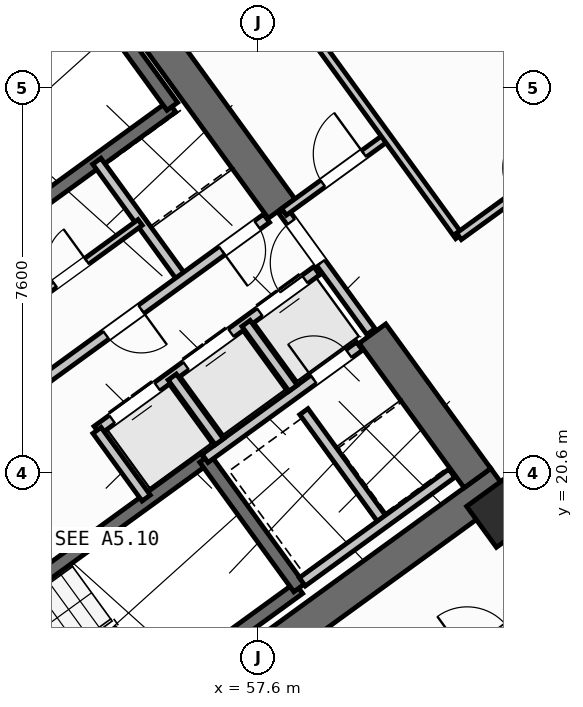
"""IFC4 building model, lengths in metres.
Left out: names, types, materials, properties, quantities, classifications, styles, units other than length and angle.
Written with IfcOpenShell. Run it as: python <this file> out.ifc"""

import sys

from ifc_helpers import new_model, si_unit, direction, frame, frame_2d, origin, origin_2d, place, context, subcontext, project, spatial, rectangle, hollow_rectangle, extrude, source, transform, mapped, element, fill, save


model = new_model("IFC4")
c1 = context("Model", 3, precision=1e-05, world=origin(), true_north=direction((0.0, 1.0)))
c2 = subcontext(c1, "Body", "Model", "MODEL_VIEW")
j1 = project(units=[si_unit("LENGTHUNIT", "METRE"), si_unit("PLANEANGLEUNIT", "RADIAN")], contexts=[c1])
p1 = place(None, origin())
s1 = spatial("IfcSite", under=j1, at=p1, CompositionType="ELEMENT")
p2 = place(p1, origin())
s2 = spatial("IfcBuilding", under=s1, at=p2, CompositionType="ELEMENT")
p3 = place(p2, frame((0.0, 0.0, 60.0)))
s3 = spatial("IfcBuildingStorey", under=s2, at=p3, CompositionType="ELEMENT", Elevation=60.0)
p4 = place(p3, frame((52.318, 13.11, 0.0), z_axis=(0.0, 0.0, 1.0), x_axis=(0.809019445368, 0.587781878776, 0.0)))
e1 = element("IfcWall", 1, at=p4, inside=s3, PredefinedType="SHEAR", context=c2, shape_type="SweptSolid", body=[
    extrude(rectangle(XDim=12.44, YDim=0.65, at=frame_2d((6.22, 0.0))), origin(), (0.0, 0.0, 1.0), 3.35),
])
p5 = place(p3, frame((44.325, 24.113, 0.0), z_axis=(0.0, 0.0, 1.0), x_axis=(0.809012664862, 0.58779121131, 0.0)))
e2 = element("IfcWall", 2, at=p5, inside=s3, PredefinedType="SHEAR", context=c2, shape_type="SweptSolid", body=[
    extrude(rectangle(XDim=12.44, YDim=0.65, at=frame_2d((6.22, 0.0))), origin(), (0.0, 0.0, 1.0), 3.35),
])
p6 = place(p3, frame((61.929, 20.494, 0.0), z_axis=(0.0, 0.0, 1.0), x_axis=(-0.58782982593, 0.808984607855, 0.0)))
e3 = element("IfcWall", 3, at=p6, inside=s3, PredefinedType="SHEAR", context=c2, shape_type="SweptSolid", body=[
    extrude(rectangle(XDim=3.525, YDim=0.65, at=frame_2d((1.762, 0.0))), origin(), (0.0, 0.0, 1.0), 3.35),
])
p7 = place(p3, frame((58.064, 25.813, 0.0), z_axis=(0.0, 0.0, 1.0), x_axis=(-0.58777996584, 0.809020835181, 0.0)))
e4 = element("IfcWall", 4, at=p7, inside=s3, PredefinedType="SHEAR", context=c2, shape_type="SweptSolid", body=[
    extrude(rectangle(XDim=6.375, YDim=0.65, at=frame_2d((3.188, 0.0))), origin(), (0.0, 0.0, 1.0), 3.35),
])
m1 = source(origin(), c2, "Body", "SweptSolid", [
    extrude(hollow_rectangle(XDim=1.0, YDim=1.0, WallThickness=0.04, at=origin_2d()), origin(), (0.0, 0.0, 1.0), 3.6),
])
for number, where, z_axis, x_axis in (
    (5, (62.414, 19.827, 0.0), (0.0, 0.0, 1.0), (0.809, 0.588, 0.0)),
    (6, (62.977, 29.259, 0.0), (0.0, 0.0, 1.0), (0.809, 0.588, 0.0)),
):
    element("IfcColumn", number, at=place(p3, frame(where, z_axis=z_axis, x_axis=x_axis)), inside=s3, PredefinedType="COLUMN", context=c2, shape_type="MappedRepresentation", body=[
        mapped(m1, transform((0.0, 0.0, 0.0), scale=1.0)),
    ])
p8 = place(p3, frame((43.938, 25.192, 0.0), z_axis=(0.0, 0.0, 1.0), x_axis=(0.809016324578, 0.587786174187, 0.0)))
e7 = element("IfcWall", 7, at=p8, inside=s3, PredefinedType="STANDARD", context=c2, shape_type="SweptSolid", body=[
    extrude(rectangle(XDim=17.587, YDim=0.32, at=frame_2d((8.794, 0.0))), origin(), (0.0, 0.0, 1.0), 3.35),
])
p9 = place(p8, frame((14.914, 0.0, 0.0)))
e8 = element("IfcOpeningElement", 8, at=p9, cuts=e7, PredefinedType="OPENING", context=c2, shape_type="SweptSolid", body=[
    extrude(rectangle(XDim=1.05, YDim=2.15, at=frame_2d((0.525, 1.075))), frame((0.0, 0.17, 0.0), z_axis=(0.0, -1.0, 0.0), x_axis=(1.0, 0.0, 0.0)), (0.0, 0.0, 1.0), 0.34),
])
p10 = place(p8, frame((2.169, 0.0, 0.8)))
e9 = element("IfcOpeningElement", 9, at=p10, cuts=e7, PredefinedType="OPENING", context=c2, shape_type="SweptSolid", body=[
    extrude(rectangle(XDim=2.1, YDim=1.55, at=frame_2d((1.05, 0.775))), frame((0.0, 0.17, 0.0), z_axis=(0.0, -1.0, 0.0), x_axis=(1.0, 0.0, 0.0)), (0.0, 0.0, 1.0), 0.34),
])
p11 = place(p8, frame((7.319, 0.0, 0.8)))
e10 = element("IfcOpeningElement", 10, at=p11, cuts=e7, PredefinedType="OPENING", context=c2, shape_type="SweptSolid", body=[
    extrude(rectangle(XDim=2.1, YDim=1.55, at=frame_2d((1.05, 0.775))), frame((0.0, 0.17, 0.0), z_axis=(0.0, -1.0, 0.0), x_axis=(1.0, 0.0, 0.0)), (0.0, 0.0, 1.0), 0.34),
])
p12 = place(p3, frame((58.455, 35.484, 0.0), z_axis=(0.0, 0.0, 1.0), x_axis=(0.587783625747, -0.809018176127, 0.0)))
e11 = element("IfcWall", 11, at=p12, inside=s3, PredefinedType="STANDARD", context=c2, shape_type="SweptSolid", body=[
    extrude(rectangle(XDim=21.587, YDim=0.32, at=frame_2d((10.794, 0.0))), origin(), (0.0, 0.0, 1.0), 2.725),
])
p13 = place(p12, frame((1.54, 0.0, 0.85)))
e12 = element("IfcOpeningElement", 12, at=p13, cuts=e11, PredefinedType="OPENING", context=c2, shape_type="SweptSolid", body=[
    extrude(rectangle(XDim=1.5, YDim=1.5, at=frame_2d((0.75, 0.75))), frame((0.0, 0.17, 0.0), z_axis=(0.0, -1.0, 0.0), x_axis=(1.0, 0.0, 0.0)), (0.0, 0.0, 1.0), 0.34),
])
p14 = place(p12, frame((4.695, 0.0, 0.85)))
e13 = element("IfcOpeningElement", 13, at=p14, cuts=e11, PredefinedType="OPENING", context=c2, shape_type="SweptSolid", body=[
    extrude(rectangle(XDim=1.8, YDim=1.5, at=frame_2d((0.9, 0.75))), frame((0.0, 0.17, 0.0), z_axis=(0.0, -1.0, 0.0), x_axis=(1.0, 0.0, 0.0)), (0.0, 0.0, 1.0), 0.34),
])
p15 = place(p12, frame((13.009, 0.0, 1.0)))
e14 = element("IfcOpeningElement", 14, at=p15, cuts=e11, PredefinedType="OPENING", context=c2, shape_type="SweptSolid", body=[
    extrude(rectangle(XDim=0.9, YDim=1.25, at=frame_2d((0.45, 0.625))), frame((0.0, 0.17, 0.0), z_axis=(0.0, -1.0, 0.0), x_axis=(1.0, 0.0, 0.0)), (0.0, 0.0, 1.0), 0.34),
])
p16 = place(p12, frame((16.092, 0.0, 0.95)))
e15 = element("IfcOpeningElement", 15, at=p16, cuts=e11, PredefinedType="OPENING", context=c2, shape_type="SweptSolid", body=[
    extrude(rectangle(XDim=1.2, YDim=1.4, at=frame_2d((0.6, 0.7))), frame((0.0, 0.17, 0.0), z_axis=(0.0, -1.0, 0.0), x_axis=(1.0, 0.0, 0.0)), (0.0, 0.0, 1.0), 0.34),
])
p17 = place(p12, frame((19.085, 0.0, 1.0)))
e16 = element("IfcOpeningElement", 16, at=p17, cuts=e11, PredefinedType="OPENING", context=c2, shape_type="SweptSolid", body=[
    extrude(rectangle(XDim=0.9, YDim=1.25, at=frame_2d((0.45, 0.625))), frame((0.0, 0.17, 0.0), z_axis=(0.0, -1.0, 0.0), x_axis=(1.0, 0.0, 0.0)), (0.0, 0.0, 1.0), 0.34),
])
p18 = place(p3, frame((71.098, 17.731, 0.0), z_axis=(0.0, 0.0, 1.0), x_axis=(-0.809021120468, -0.587779573171, 0.0)))
e17 = element("IfcWall", 17, at=p18, inside=s3, PredefinedType="STANDARD", context=c2, shape_type="SweptSolid", body=[
    extrude(rectangle(XDim=17.588, YDim=0.32, at=frame_2d((8.794, 0.0))), origin(), (0.0, 0.0, 1.0), 3.35),
])
p19 = place(p18, frame((1.624, 0.0, 0.0)))
e18 = element("IfcOpeningElement", 18, at=p19, cuts=e17, PredefinedType="OPENING", context=c2, shape_type="SweptSolid", body=[
    extrude(rectangle(XDim=1.05, YDim=2.15, at=frame_2d((0.525, 1.075))), frame((0.0, 0.17, 0.0), z_axis=(0.0, -1.0, 0.0), x_axis=(1.0, 0.0, 0.0)), (0.0, 0.0, 1.0), 0.34),
])
p20 = place(p18, frame((4.104, 0.0, 1.0)))
e19 = element("IfcOpeningElement", 19, at=p20, cuts=e17, PredefinedType="OPENING", context=c2, shape_type="SweptSolid", body=[
    extrude(rectangle(XDim=0.9, YDim=1.25, at=frame_2d((0.45, 0.625))), frame((0.0, 0.17, 0.0), z_axis=(0.0, -1.0, 0.0), x_axis=(1.0, 0.0, 0.0)), (0.0, 0.0, 1.0), 0.34),
])
p21 = place(p18, frame((7.879, 0.0, 0.85)))
e20 = element("IfcOpeningElement", 20, at=p21, cuts=e17, PredefinedType="OPENING", context=c2, shape_type="SweptSolid", body=[
    extrude(rectangle(XDim=1.8, YDim=1.5, at=frame_2d((0.9, 0.75))), frame((0.0, 0.17, 0.0), z_axis=(0.0, -1.0, 0.0), x_axis=(1.0, 0.0, 0.0)), (0.0, 0.0, 1.0), 0.34),
])
p22 = place(p18, frame((13.529, 0.0, 0.85)))
e21 = element("IfcOpeningElement", 21, at=p22, cuts=e17, PredefinedType="OPENING", context=c2, shape_type="SweptSolid", body=[
    extrude(rectangle(XDim=1.5, YDim=1.5, at=frame_2d((0.75, 0.75))), frame((0.0, 0.17, 0.0), z_axis=(0.0, -1.0, 0.0), x_axis=(1.0, 0.0, 0.0)), (0.0, 0.0, 1.0), 0.34),
])
p23 = place(p3, frame((48.006, 25.996, 0.0), z_axis=(0.0, 0.0, 1.0), x_axis=(0.80901903764, 0.587782439969, 0.0)))
e22 = element("IfcWall", 22, at=p23, inside=s3, PredefinedType="SHEAR", context=c2, shape_type="SweptSolid", body=[
    extrude(rectangle(XDim=7.46, YDim=0.26, at=frame_2d((3.73, 0.0))), origin(), (0.0, 0.0, 1.0), 3.35),
])
p24 = place(p3, frame((49.863, 23.44, 0.0), z_axis=(0.0, 0.0, 1.0), x_axis=(0.809003474932, 0.587803859759, 0.0)))
e23 = element("IfcWall", 23, at=p24, inside=s3, PredefinedType="SHEAR", context=c2, shape_type="SweptSolid", body=[
    extrude(rectangle(XDim=7.46, YDim=0.26, at=frame_2d((3.73, 0.0))), origin(), (0.0, 0.0, 1.0), 3.35),
])
p25 = place(p24, frame((0.36, 0.0, 0.0)))
e24 = element("IfcOpeningElement", 24, at=p25, cuts=e23, PredefinedType="OPENING", context=c2, shape_type="SweptSolid", body=[
    extrude(rectangle(XDim=0.86, YDim=2.05, at=frame_2d((0.43, 1.025))), frame((0.0, 0.14, 0.0), z_axis=(0.0, -1.0, 0.0), x_axis=(1.0, 0.0, 0.0)), (0.0, 0.0, 1.0), 0.28),
])
p26 = place(p3, frame((55.906, 27.831, 0.0), z_axis=(0.0, 0.0, 1.0), x_axis=(-0.587804123638, 0.809003283204, 0.0)))
e25 = element("IfcWall", 25, at=p26, inside=s3, PredefinedType="SHEAR", context=c2, shape_type="SweptSolid", body=[
    extrude(rectangle(XDim=3.16, YDim=0.26, at=frame_2d((1.58, 0.0))), origin(), (0.0, 0.0, 1.0), 3.35),
])
p27 = place(p3, frame((52.472, 14.013, 0.0), z_axis=(0.0, 0.0, 1.0), x_axis=(0.809028366311, 0.587769599847, 0.0)))
e26 = element("IfcWall", 26, at=p27, inside=s3, PredefinedType="SHEAR", context=c2, shape_type="SweptSolid", body=[
    extrude(rectangle(XDim=7.33, YDim=0.26, at=frame_2d((3.665, 0.0))), origin(), (0.0, 0.0, 1.0), 3.35),
])
p28 = place(p3, frame((50.615, 16.57, 0.0), z_axis=(0.0, 0.0, 1.0), x_axis=(0.809028366311, 0.587769599847, 0.0)))
e27 = element("IfcWall", 27, at=p28, inside=s3, PredefinedType="SHEAR", context=c2, shape_type="SweptSolid", body=[
    extrude(rectangle(XDim=7.33, YDim=0.26, at=frame_2d((3.665, 0.0))), origin(), (0.0, 0.0, 1.0), 3.35),
])
p29 = place(p28, frame((0.22, 0.0, 0.0)))
e28 = element("IfcOpeningElement", 28, at=p29, cuts=e27, PredefinedType="OPENING", context=c2, shape_type="SweptSolid", body=[
    extrude(rectangle(XDim=1.1, YDim=2.1, at=frame_2d((0.55, 1.05))), frame((0.0, 0.14, 0.0), z_axis=(0.0, -1.0, 0.0), x_axis=(1.0, 0.0, 0.0)), (0.0, 0.0, 1.0), 0.28),
])
p30 = place(p3, frame((58.41, 18.327, 0.0), z_axis=(0.0, 0.0, 1.0), x_axis=(-0.58776738483, 0.809029975545, 0.0)))
e29 = element("IfcWall", 29, at=p30, inside=s3, PredefinedType="SHEAR", context=c2, shape_type="SweptSolid", body=[
    extrude(rectangle(XDim=3.16, YDim=0.26, at=frame_2d((1.58, 0.0))), origin(), (0.0, 0.0, 1.0), 3.35),
])
p31 = place(p3, frame((56.553, 20.884, 0.0), z_axis=(0.0, 0.0, 1.0), x_axis=(0.809035789462, 0.587759382205, 0.0)))
e30 = element("IfcWall", 30, at=p31, inside=s3, PredefinedType="STANDARD", context=c2, shape_type="SweptSolid", body=[
    extrude(rectangle(XDim=3.768, YDim=0.2, at=frame_2d((1.884, 0.0))), origin(), (0.0, 0.0, 1.0), 3.34),
])
p32 = place(p31, frame((2.65, 0.0, 0.0)))
e31 = element("IfcOpeningElement", 31, at=p32, cuts=e30, PredefinedType="OPENING", context=c2, shape_type="SweptSolid", body=[
    extrude(rectangle(XDim=0.86, YDim=2.05, at=frame_2d((0.43, 1.025))), frame((0.0, 0.11, 0.0), z_axis=(0.0, -1.0, 0.0), x_axis=(1.0, 0.0, 0.0)), (0.0, 0.0, 1.0), 0.22),
])
p33 = place(p3, frame((54.421, 21.436, 0.0), z_axis=(0.0, 0.0, 1.0), x_axis=(0.809013710463, 0.587789772183, 0.0)))
e32 = element("IfcWall", 32, at=p33, inside=s3, PredefinedType="STANDARD", context=c2, shape_type="SweptSolid", body=[
    extrude(rectangle(XDim=5.36, YDim=0.2, at=frame_2d((2.68, 0.0))), origin(), (0.0, 0.0, 1.0), 3.34),
])
p34 = place(p33, frame((0.37, 0.0, 0.0)))
e33 = element("IfcOpeningElement", 33, at=p34, cuts=e32, PredefinedType="OPENING", context=c2, shape_type="SweptSolid", body=[
    extrude(rectangle(XDim=1.1, YDim=2.15, at=frame_2d((0.55, 1.075))), frame((0.0, 0.11, 0.0), z_axis=(0.0, -1.0, 0.0), x_axis=(1.0, 0.0, 0.0)), (0.0, 0.0, 1.0), 0.22),
])
p35 = place(p33, frame((2.17, 0.0, 0.0)))
e34 = element("IfcOpeningElement", 34, at=p35, cuts=e32, PredefinedType="OPENING", context=c2, shape_type="SweptSolid", body=[
    extrude(rectangle(XDim=1.1, YDim=2.15, at=frame_2d((0.55, 1.075))), frame((0.0, 0.11, 0.0), z_axis=(0.0, -1.0, 0.0), x_axis=(1.0, 0.0, 0.0)), (0.0, 0.0, 1.0), 0.22),
])
p36 = place(p33, frame((3.97, 0.0, 0.0)))
e35 = element("IfcOpeningElement", 35, at=p36, cuts=e32, PredefinedType="OPENING", context=c2, shape_type="SweptSolid", body=[
    extrude(rectangle(XDim=1.1, YDim=2.15, at=frame_2d((0.55, 1.075))), frame((0.0, 0.11, 0.0), z_axis=(0.0, -1.0, 0.0), x_axis=(1.0, 0.0, 0.0)), (0.0, 0.0, 1.0), 0.22),
])
p37 = place(p3, frame((55.391, 20.102, 0.0), z_axis=(0.0, 0.0, 1.0), x_axis=(-0.58778447739, 0.809017557374, 0.0)))
e36 = element("IfcWall", 36, at=p37, inside=s3, PredefinedType="STANDARD", context=c2, shape_type="SweptSolid", body=[
    extrude(rectangle(XDim=1.65, YDim=0.2, at=frame_2d((0.825, 0.0))), origin(), (0.0, 0.0, 1.0), 3.34),
])
p38 = place(p3, frame((56.834, 21.212, 0.0), z_axis=(0.0, 0.0, 1.0), x_axis=(-0.58776738483, 0.809029975545, 0.0)))
e37 = element("IfcWall", 37, at=p38, inside=s3, PredefinedType="STANDARD", context=c2, shape_type="SweptSolid", body=[
    extrude(rectangle(XDim=1.58, YDim=0.2, at=frame_2d((0.79, 0.0))), origin(), (0.0, 0.0, 1.0), 3.34),
])
p39 = place(p3, frame((58.29, 22.27, 0.0), z_axis=(0.0, 0.0, 1.0), x_axis=(-0.587840865826, 0.808976585857, 0.0)))
e38 = element("IfcWall", 38, at=p39, inside=s3, PredefinedType="STANDARD", context=c2, shape_type="SweptSolid", body=[
    extrude(rectangle(XDim=1.58, YDim=0.2, at=frame_2d((0.79, 0.0))), origin(), (0.0, 0.0, 1.0), 3.34),
])
p40 = place(p3, frame((60.067, 19.655, 0.0), z_axis=(0.0, 0.0, 1.0), x_axis=(-0.587800520745, 0.809005900975, 0.0)))
e39 = element("IfcWall", 39, at=p40, inside=s3, PredefinedType="STANDARD", context=c2, shape_type="SweptSolid", body=[
    extrude(rectangle(XDim=2.66, YDim=0.2, at=frame_2d((1.33, 0.0))), origin(), (0.0, 0.0, 1.0), 3.34),
])
p41 = place(p3, frame((58.472, 18.447, 0.0), z_axis=(0.0, 0.0, 1.0), x_axis=(0.809022487728, 0.587777691266, 0.0)))
e40 = element("IfcWall", 40, at=p41, inside=s3, PredefinedType="STANDARD", context=c2, shape_type="SweptSolid", body=[
    extrude(rectangle(XDim=3.648, YDim=0.2, at=frame_2d((1.824, 0.0))), origin(), (0.0, 0.0, 1.0), 3.34),
])
p42 = place(p3, frame((56.111, 24.419, 0.0), z_axis=(0.0, 0.0, 1.0), x_axis=(-0.58777848983, 0.809021907548, 0.0)))
e41 = element("IfcWall", 41, at=p42, inside=s3, PredefinedType="STANDARD", context=c2, shape_type="SweptSolid", body=[
    extrude(rectangle(XDim=2.88, YDim=0.2, at=frame_2d((1.44, 0.0))), origin(), (0.0, 0.0, 1.0), 3.34),
])
p43 = place(p3, frame((53.425, 22.468, 0.0), z_axis=(0.0, 0.0, 1.0), x_axis=(0.80902705128, 0.587771409902, 0.0)))
e42 = element("IfcWall", 42, at=p43, inside=s3, PredefinedType="STANDARD", context=c2, shape_type="SweptSolid", body=[
    extrude(rectangle(XDim=5.368, YDim=0.2, at=frame_2d((2.684, 0.0))), origin(), (0.0, 0.0, 1.0), 3.34),
])
p44 = place(p43, frame((4.28, 0.0, 0.0)))
e43 = element("IfcOpeningElement", 43, at=p44, cuts=e42, PredefinedType="OPENING", context=c2, shape_type="SweptSolid", body=[
    extrude(rectangle(XDim=0.86, YDim=2.05, at=frame_2d((0.43, 1.025))), frame((0.0, 0.11, 0.0), z_axis=(0.0, -1.0, 0.0), x_axis=(1.0, 0.0, 0.0)), (0.0, 0.0, 1.0), 0.22),
])
p45 = place(p43, frame((1.45, 0.0, 0.0)))
e44 = element("IfcOpeningElement", 44, at=p45, cuts=e42, PredefinedType="OPENING", context=c2, shape_type="SweptSolid", body=[
    extrude(rectangle(XDim=0.86, YDim=2.05, at=frame_2d((0.43, 1.025))), frame((0.0, 0.11, 0.0), z_axis=(0.0, -1.0, 0.0), x_axis=(1.0, 0.0, 0.0)), (0.0, 0.0, 1.0), 0.22),
])
p46 = place(p3, frame((52.618, 23.612, 0.0), z_axis=(0.0, 0.0, 1.0), x_axis=(0.809009587469, 0.587795446889, 0.0)))
e45 = element("IfcWall", 45, at=p46, inside=s3, PredefinedType="PLUMBINGWALL", context=c2, shape_type="SweptSolid", body=[
    extrude(rectangle(XDim=3.28, YDim=0.14, at=frame_2d((1.64, 0.0))), origin(), (0.0, 0.0, 1.0), 3.34),
])
p47 = place(p46, frame((1.2, 0.0, 0.0)))
e46 = element("IfcOpeningElement", 46, at=p47, cuts=e45, PredefinedType="OPENING", context=c2, shape_type="SweptSolid", body=[
    extrude(rectangle(XDim=0.78, YDim=2.05, at=frame_2d((0.39, 1.025))), frame((0.0, 0.08, 0.0), z_axis=(0.0, -1.0, 0.0), x_axis=(1.0, 0.0, 0.0)), (0.0, 0.0, 1.0), 0.16),
])
p48 = place(p3, frame((59.827, 23.386, 0.0), z_axis=(0.0, 0.0, 1.0), x_axis=(-0.587803840107, 0.809003489211, 0.0)))
e47 = element("IfcWall", 47, at=p48, inside=s3, PredefinedType="STANDARD", context=c2, shape_type="SweptSolid", body=[
    extrude(rectangle(XDim=2.96, YDim=0.2, at=frame_2d((1.48, 0.0))), origin(), (0.0, 0.0, 1.0), 3.34),
])
p49 = place(p48, frame((1.68, 0.0, 0.0)))
e48 = element("IfcOpeningElement", 48, at=p49, cuts=e47, PredefinedType="OPENING", context=c2, shape_type="SweptSolid", body=[
    extrude(rectangle(XDim=1.0, YDim=2.1, at=frame_2d((0.5, 1.05))), frame((0.0, 0.11, 0.0), z_axis=(0.0, -1.0, 0.0), x_axis=(1.0, 0.0, 0.0)), (0.0, 0.0, 1.0), 0.22),
])
p50 = place(p3, frame((58.111, 25.749, 0.0), z_axis=(0.0, 0.0, 1.0), x_axis=(0.809000999347, 0.58780726693, 0.0)))
e49 = element("IfcWall", 49, at=p50, inside=s3, PredefinedType="PARTITIONING", context=c2, shape_type="SweptSolid", body=[
    extrude(rectangle(XDim=2.51, YDim=0.16, at=frame_2d((1.255, 0.0))), origin(), (0.0, 0.0, 1.0), 2.725),
])
p51 = place(p50, frame((0.95, 0.0, 0.0)))
e50 = element("IfcOpeningElement", 50, at=p51, cuts=e49, PredefinedType="OPENING", context=c2, shape_type="SweptSolid", body=[
    extrude(rectangle(XDim=1.0, YDim=2.1, at=frame_2d((0.5, 1.05))), frame((0.0, 0.09, 0.0), z_axis=(0.0, -1.0, 0.0), x_axis=(1.0, 0.0, 0.0)), (0.0, 0.0, 1.0), 0.18),
])
p52 = place(p3, frame((61.564, 25.266, 0.0), z_axis=(0.0, 0.0, 1.0), x_axis=(-0.587792629712, 0.809011634314, 0.0)))
e51 = element("IfcWall", 51, at=p52, inside=s3, PredefinedType="PARTITIONING", context=c2, shape_type="SweptSolid", body=[
    extrude(rectangle(XDim=10.15, YDim=0.16, at=frame_2d((5.075, 0.0))), origin(), (0.0, 0.0, 1.0), 3.34),
])
p53 = place(p3, frame((61.564, 25.266, 0.0), z_axis=(0.0, 0.0, 1.0), x_axis=(0.809012309495, 0.587791700422, 0.0)))
e52 = element("IfcWall", 52, at=p53, inside=s3, PredefinedType="PARTITIONING", context=c2, shape_type="SweptSolid", body=[
    extrude(rectangle(XDim=3.63, YDim=0.16, at=frame_2d((1.815, 0.0))), origin(), (0.0, 0.0, 1.0), 3.34),
])
p54 = place(p53, frame((1.305, 0.0, 0.0)))
e53 = element("IfcOpeningElement", 53, at=p54, cuts=e52, PredefinedType="OPENING", context=c2, shape_type="SweptSolid", body=[
    extrude(rectangle(XDim=1.0, YDim=2.1, at=frame_2d((0.5, 1.05))), frame((0.0, 0.09, 0.0), z_axis=(0.0, -1.0, 0.0), x_axis=(1.0, 0.0, 0.0)), (0.0, 0.0, 1.0), 0.18),
])
p55 = place(p3, frame((53.705, 11.126, 0.0), z_axis=(0.0, 0.0, 1.0), x_axis=(0.809014504436, 0.587788679384, 0.0)))
e54 = element("IfcWall", 54, at=p55, inside=s3, PredefinedType="PARTITIONING", context=c2, shape_type="SweptSolid", body=[
    extrude(rectangle(XDim=14.67, YDim=0.16, at=frame_2d((7.335, 0.0))), origin(), (0.0, 0.0, 1.0), 3.34),
])
p56 = place(p55, frame((3.215, 0.0, 0.0)))
e55 = element("IfcOpeningElement", 55, at=p56, cuts=e54, PredefinedType="OPENING", context=c2, shape_type="SweptSolid", body=[
    extrude(rectangle(XDim=1.0, YDim=2.1, at=frame_2d((0.5, 1.05))), frame((0.0, 0.09, 0.0), z_axis=(0.0, -1.0, 0.0), x_axis=(1.0, 0.0, 0.0)), (0.0, 0.0, 1.0), 0.18),
])
p57 = place(p55, frame((9.915, 0.0, 0.0)))
e56 = element("IfcOpeningElement", 56, at=p57, cuts=e54, PredefinedType="OPENING", context=c2, shape_type="SweptSolid", body=[
    extrude(rectangle(XDim=1.0, YDim=2.1, at=frame_2d((0.5, 1.05))), frame((0.0, 0.09, 0.0), z_axis=(0.0, -1.0, 0.0), x_axis=(1.0, 0.0, 0.0)), (0.0, 0.0, 1.0), 0.18),
])
m2 = source(origin(), c2, "Body", "SweptSolid", [
    extrude(rectangle(XDim=1.1, YDim=2.15, at=frame_2d((0.55, 1.075))), frame((0.0, 0.025, 0.0), z_axis=(0.0, -1.0, 0.0), x_axis=(1.0, 0.0, 0.0)), (0.0, 0.0, 1.0), 0.05),
])
p58 = place(p34, origin())
e57 = element("IfcDoor", 57, at=p58, inside=s3, OperationType="DOUBLE_DOOR_SLIDING", PredefinedType="DOOR", context=c2, shape_type="MappedRepresentation", body=[
    mapped(m2, transform((0.0, 0.0, 0.0), scale=1.0)),
])
fill(e33, e57)
p59 = place(p35, origin())
e58 = element("IfcDoor", 58, at=p59, inside=s3, OperationType="DOUBLE_DOOR_SLIDING", PredefinedType="DOOR", context=c2, shape_type="MappedRepresentation", body=[
    mapped(m2, transform((0.0, 0.0, 0.0), scale=1.0)),
])
fill(e34, e58)
p60 = place(p36, origin())
e59 = element("IfcDoor", 59, at=p60, inside=s3, OperationType="DOUBLE_DOOR_SLIDING", PredefinedType="DOOR", context=c2, shape_type="MappedRepresentation", body=[
    mapped(m2, transform((0.0, 0.0, 0.0), scale=1.0)),
])
fill(e35, e59)
m3 = source(origin(), c2, "Body", "SweptSolid", [
    extrude(rectangle(XDim=0.86, YDim=2.05, at=frame_2d((0.43, 1.025))), frame((0.0, 0.025, 0.0), z_axis=(0.0, -1.0, 0.0), x_axis=(1.0, 0.0, 0.0)), (0.0, 0.0, 1.0), 0.05),
])
p61 = place(p32, origin())
e60 = element("IfcDoor", 60, at=p61, inside=s3, OperationType="SINGLE_SWING_LEFT", PredefinedType="DOOR", context=c2, shape_type="MappedRepresentation", body=[
    mapped(m3, transform((0.0, 0.0, 0.0), scale=1.0)),
])
fill(e31, e60)
p62 = place(p44, frame((0.86, 0.0, 0.0), z_axis=(0.0, 0.0, 1.0), x_axis=(-1.0, 0.0, 0.0)))
e61 = element("IfcDoor", 61, at=p62, inside=s3, OperationType="SINGLE_SWING_RIGHT", PredefinedType="DOOR", context=c2, shape_type="MappedRepresentation", body=[
    mapped(m3, transform((0.0, 0.0, 0.0), scale=1.0)),
])
fill(e43, e61)
p63 = place(p45, frame((0.86, 0.0, 0.0), z_axis=(0.0, 0.0, 1.0), x_axis=(-1.0, 0.0, 0.0)))
e62 = element("IfcDoor", 62, at=p63, inside=s3, OperationType="SINGLE_SWING_LEFT", PredefinedType="DOOR", context=c2, shape_type="MappedRepresentation", body=[
    mapped(m3, transform((0.0, 0.0, 0.0), scale=1.0)),
])
fill(e44, e62)
m4 = source(origin(), c2, "Body", "SweptSolid", [
    extrude(rectangle(XDim=0.78, YDim=2.05, at=frame_2d((0.39, 1.025))), frame((0.0, 0.025, 0.0), z_axis=(0.0, -1.0, 0.0), x_axis=(1.0, 0.0, 0.0)), (0.0, 0.0, 1.0), 0.05),
])
p64 = place(p47, origin())
e63 = element("IfcDoor", 63, at=p64, inside=s3, OperationType="SINGLE_SWING_RIGHT", PredefinedType="DOOR", context=c2, shape_type="MappedRepresentation", body=[
    mapped(m4, transform((0.0, 0.0, 0.0), scale=1.0)),
])
fill(e46, e63)
m5 = source(origin(), c2, "Body", "SweptSolid", [
    extrude(rectangle(XDim=1.0, YDim=2.1, at=frame_2d((0.5, 1.05))), frame((0.0, 0.025, 0.0), z_axis=(0.0, -1.0, 0.0), x_axis=(1.0, 0.0, 0.0)), (0.0, 0.0, 1.0), 0.05),
])
p65 = place(p51, origin())
e64 = element("IfcDoor", 64, at=p65, inside=s3, OperationType="SINGLE_SWING_RIGHT", PredefinedType="DOOR", context=c2, shape_type="MappedRepresentation", body=[
    mapped(m5, transform((0.0, 0.0, 0.0), scale=1.0)),
])
fill(e50, e64)
p66 = place(p49, origin())
e65 = element("IfcDoor", 65, at=p66, inside=s3, OperationType="SINGLE_SWING_LEFT", PredefinedType="DOOR", context=c2, shape_type="MappedRepresentation", body=[
    mapped(m5, transform((0.0, 0.0, 0.0), scale=1.0)),
])
fill(e48, e65)
p67 = place(p57, origin())
e66 = element("IfcDoor", 66, at=p67, inside=s3, OperationType="SINGLE_SWING_LEFT", PredefinedType="DOOR", context=c2, shape_type="MappedRepresentation", body=[
    mapped(m5, transform((0.0, 0.0, 0.0), scale=1.0)),
])
fill(e56, e66)
save(model, sys.argv[1])
